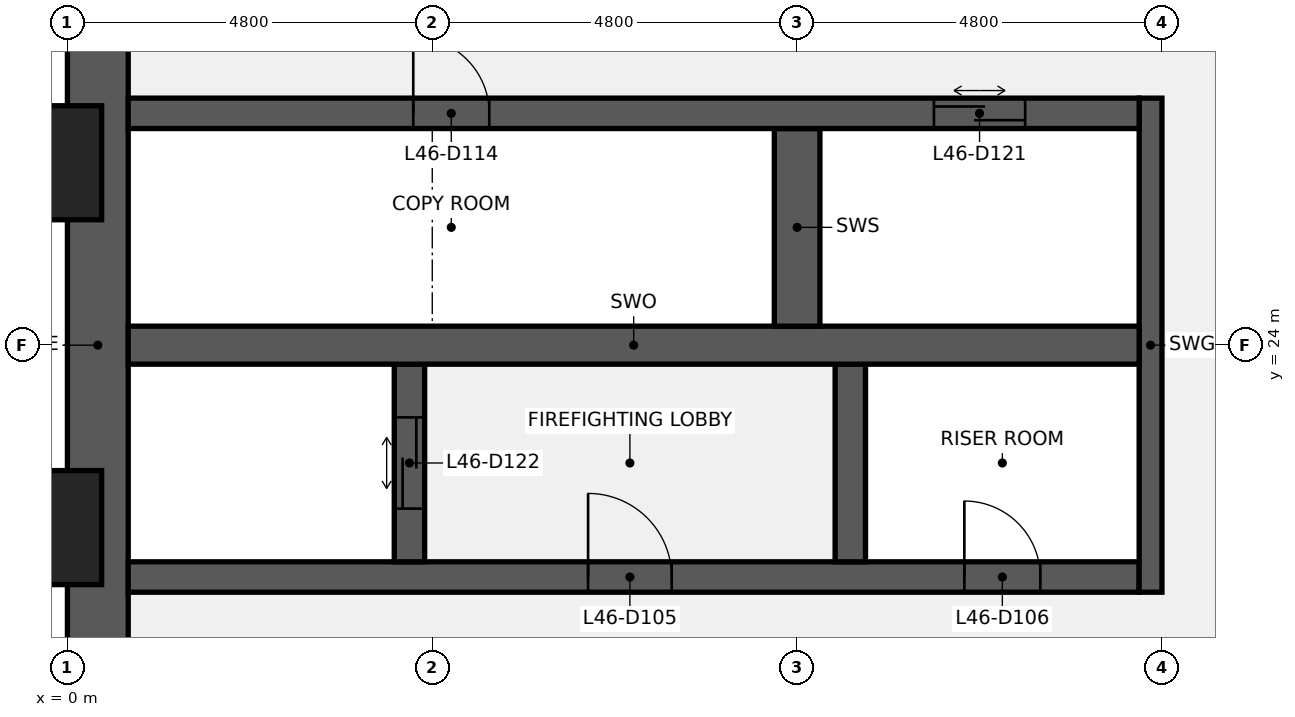
"""IFC4 building model, lengths in metres.
Left out: names, types, materials, properties, quantities, classifications, styles, units other than length and angle.
Written with IfcOpenShell. Run it as: python <this file> out.ifc"""

import sys

from ifc_helpers import new_model, si_unit, direction, frame, frame_2d, origin, origin_2d, place, context, subcontext, project, spatial, rectangle, extrude, element, fill, save


model = new_model("IFC4")
c1 = context("Model", 3, precision=1e-05, world=origin(), true_north=direction((0.0, 1.0)))
c2 = subcontext(c1, "Body", "Model", "MODEL_VIEW")
j1 = project(units=[si_unit("LENGTHUNIT", "METRE"), si_unit("PLANEANGLEUNIT", "RADIAN")], contexts=[c1])
p1 = place(None, origin())
s1 = spatial("IfcSite", under=j1, at=p1, CompositionType="ELEMENT")
p2 = place(p1, origin())
s2 = spatial("IfcBuilding", under=s1, at=p2, CompositionType="ELEMENT")
p3 = place(p2, frame((0.0, 0.0, 213.2)))
s3 = spatial("IfcBuildingStorey", under=s2, at=p3, CompositionType="ELEMENT", Elevation=213.2)
p4 = place(p3, frame((0.4, 9.6, 0.0), z_axis=(0.0, 0.0, 1.0), x_axis=(0.0, 1.0, 0.0)))
e1 = element("IfcWall", 1, at=p4, inside=s3, PredefinedType="SHEAR", context=c2, shape_type="SweptSolid", body=[
    extrude(rectangle(XDim=28.8, YDim=0.8, at=frame_2d((14.4, 0.0))), origin(), (0.0, 0.0, 1.0), 3.84),
])
p5 = place(p4, frame((8.85, 0.0, 0.9)))
e2 = element("IfcOpeningElement", 2, at=p5, cuts=e1, PredefinedType="OPENING", context=c2, shape_type="SweptSolid", body=[
    extrude(rectangle(XDim=1.5, YDim=1.5, at=frame_2d((0.75, 0.75))), frame((0.0, 0.41, 0.0), z_axis=(0.0, -1.0, 0.0), x_axis=(1.0, 0.0, 0.0)), (0.0, 0.0, 1.0), 0.82),
])
p6 = place(p4, frame((18.45, 0.0, 0.9)))
e3 = element("IfcOpeningElement", 3, at=p6, cuts=e1, PredefinedType="OPENING", context=c2, shape_type="SweptSolid", body=[
    extrude(rectangle(XDim=1.5, YDim=1.5, at=frame_2d((0.75, 0.75))), frame((0.0, 0.41, 0.0), z_axis=(0.0, -1.0, 0.0), x_axis=(1.0, 0.0, 0.0)), (0.0, 0.0, 1.0), 0.82),
])
p7 = place(p3, frame((0.8, 20.95, 0.0), z_axis=(0.0, 0.0, 1.0), x_axis=(1.0, 0.0, 0.0)))
e4 = element("IfcWall", 4, at=p7, inside=s3, PredefinedType="SHEAR", context=c2, shape_type="SweptSolid", body=[
    extrude(rectangle(XDim=13.3, YDim=0.4, at=frame_2d((6.65, 0.0))), origin(), (0.0, 0.0, 1.0), 3.84),
])
p8 = place(p7, frame((6.05, 0.0, 0.0)))
e5 = element("IfcOpeningElement", 5, at=p8, cuts=e4, PredefinedType="OPENING", context=c2, shape_type="SweptSolid", body=[
    extrude(rectangle(XDim=1.1, YDim=2.1, at=frame_2d((0.55, 1.05))), frame((0.0, 0.21, 0.0), z_axis=(0.0, -1.0, 0.0), x_axis=(1.0, 0.0, 0.0)), (0.0, 0.0, 1.0), 0.42),
])
p9 = place(p7, frame((11.0, 0.0, 0.0)))
e6 = element("IfcOpeningElement", 6, at=p9, cuts=e4, PredefinedType="OPENING", context=c2, shape_type="SweptSolid", body=[
    extrude(rectangle(XDim=1.0, YDim=2.1, at=frame_2d((0.5, 1.05))), frame((0.0, 0.21, 0.0), z_axis=(0.0, -1.0, 0.0), x_axis=(1.0, 0.0, 0.0)), (0.0, 0.0, 1.0), 0.42),
])
p10 = place(p3, frame((14.25, 20.75, 0.0), z_axis=(0.0, 0.0, 1.0), x_axis=(0.0, 1.0, 0.0)))
e7 = element("IfcWall", 7, at=p10, inside=s3, PredefinedType="SHEAR", context=c2, shape_type="SweptSolid", body=[
    extrude(rectangle(XDim=6.5, YDim=0.3, at=frame_2d((3.25, 0.0))), origin(), (0.0, 0.0, 1.0), 3.84),
])
p11 = place(p3, frame((4.5, 21.15, 0.0), z_axis=(0.0, 0.0, 1.0), x_axis=(0.0, 1.0, 0.0)))
e8 = element("IfcWall", 8, at=p11, inside=s3, PredefinedType="SHEAR", context=c2, shape_type="SweptSolid", body=[
    extrude(rectangle(XDim=2.6, YDim=0.4, at=frame_2d((1.3, 0.0))), origin(), (0.0, 0.0, 1.0), 3.84),
])
p12 = place(p11, frame((0.7, 0.0, 0.0)))
e9 = element("IfcOpeningElement", 9, at=p12, cuts=e8, PredefinedType="OPENING", context=c2, shape_type="SweptSolid", body=[
    extrude(rectangle(XDim=1.2, YDim=2.1, at=frame_2d((0.6, 1.05))), frame((0.0, 0.21, 0.0), z_axis=(0.0, -1.0, 0.0), x_axis=(1.0, 0.0, 0.0)), (0.0, 0.0, 1.0), 0.42),
])
p13 = place(p3, frame((10.3, 21.15, 0.0), z_axis=(0.0, 0.0, 1.0), x_axis=(0.0, 1.0, 0.0)))
e10 = element("IfcWall", 10, at=p13, inside=s3, PredefinedType="SHEAR", context=c2, shape_type="SweptSolid", body=[
    extrude(rectangle(XDim=2.6, YDim=0.4, at=frame_2d((1.3, 0.0))), origin(), (0.0, 0.0, 1.0), 3.84),
])
p14 = place(p3, frame((0.8, 24.0, 0.0), z_axis=(0.0, 0.0, 1.0), x_axis=(1.0, 0.0, 0.0)))
e11 = element("IfcWall", 11, at=p14, inside=s3, PredefinedType="SHEAR", context=c2, shape_type="SweptSolid", body=[
    extrude(rectangle(XDim=13.3, YDim=0.5, at=frame_2d((6.65, 0.0))), origin(), (0.0, 0.0, 1.0), 3.84),
])
p15 = place(p3, frame((9.6, 24.25, 0.0), z_axis=(0.0, 0.0, 1.0), x_axis=(0.0, 1.0, 0.0)))
e12 = element("IfcWall", 12, at=p15, inside=s3, PredefinedType="SHEAR", context=c2, shape_type="SweptSolid", body=[
    extrude(rectangle(XDim=2.6, YDim=0.6, at=frame_2d((1.3, 0.0))), origin(), (0.0, 0.0, 1.0), 3.84),
])
p16 = place(p3, frame((0.8, 27.05, 0.0), z_axis=(0.0, 0.0, 1.0), x_axis=(1.0, 0.0, 0.0)))
e13 = element("IfcWall", 13, at=p16, inside=s3, PredefinedType="SHEAR", context=c2, shape_type="SweptSolid", body=[
    extrude(rectangle(XDim=13.3, YDim=0.4, at=frame_2d((6.65, 0.0))), origin(), (0.0, 0.0, 1.0), 3.84),
])
p17 = place(p16, frame((3.75, 0.0, 0.0)))
e14 = element("IfcOpeningElement", 14, at=p17, cuts=e13, PredefinedType="OPENING", context=c2, shape_type="SweptSolid", body=[
    extrude(rectangle(XDim=1.0, YDim=2.1, at=frame_2d((0.5, 1.05))), frame((0.0, 0.21, 0.0), z_axis=(0.0, -1.0, 0.0), x_axis=(1.0, 0.0, 0.0)), (0.0, 0.0, 1.0), 0.42),
])
p18 = place(p16, frame((10.6, 0.0, 0.0)))
e15 = element("IfcOpeningElement", 15, at=p18, cuts=e13, PredefinedType="OPENING", context=c2, shape_type="SweptSolid", body=[
    extrude(rectangle(XDim=1.2, YDim=2.1, at=frame_2d((0.6, 1.05))), frame((0.0, 0.21, 0.0), z_axis=(0.0, -1.0, 0.0), x_axis=(1.0, 0.0, 0.0)), (0.0, 0.0, 1.0), 0.42),
])
for number, where, z_axis, x_axis in (
    (16, (-0.75, 21.6, 0.0), (0.0, 0.0, 1.0), (0.0, 1.0, 0.0)),
    (17, (-0.75, 26.4, 0.0), (0.0, 0.0, 1.0), (0.0, 1.0, 0.0)),
):
    element("IfcColumn", number, at=place(p3, frame(where, z_axis=z_axis, x_axis=x_axis)), inside=s3, PredefinedType="PILASTER", context=c2, shape_type="SweptSolid", body=[
        extrude(rectangle(XDim=2.4, YDim=1.5, at=origin_2d()), origin(), (0.0, 0.0, 1.0), 4.0),
    ])
p19 = place(p8, origin())
e18 = element("IfcDoor", 18, at=p19, inside=s3, OperationType="SINGLE_SWING_LEFT", PredefinedType="DOOR", context=c2, shape_type="SweptSolid", body=[
    extrude(rectangle(XDim=1.1, YDim=2.1, at=frame_2d((0.55, 1.05))), frame((0.0, 0.025, 0.0), z_axis=(0.0, -1.0, 0.0), x_axis=(1.0, 0.0, 0.0)), (0.0, 0.0, 1.0), 0.05),
])
fill(e5, e18)
p20 = place(p9, origin())
e19 = element("IfcDoor", 19, at=p20, inside=s3, OperationType="SINGLE_SWING_LEFT", PredefinedType="DOOR", context=c2, shape_type="SweptSolid", body=[
    extrude(rectangle(XDim=1.0, YDim=2.1, at=frame_2d((0.5, 1.05))), frame((0.0, 0.025, 0.0), z_axis=(0.0, -1.0, 0.0), x_axis=(1.0, 0.0, 0.0)), (0.0, 0.0, 1.0), 0.05),
])
fill(e6, e19)
p21 = place(p17, origin())
e20 = element("IfcDoor", 20, at=p21, inside=s3, OperationType="SINGLE_SWING_LEFT", PredefinedType="DOOR", context=c2, shape_type="SweptSolid", body=[
    extrude(rectangle(XDim=1.0, YDim=2.1, at=frame_2d((0.5, 1.05))), frame((0.0, 0.025, 0.0), z_axis=(0.0, -1.0, 0.0), x_axis=(1.0, 0.0, 0.0)), (0.0, 0.0, 1.0), 0.05),
])
fill(e14, e20)
p22 = place(p18, origin())
e21 = element("IfcDoor", 21, at=p22, inside=s3, OperationType="DOUBLE_DOOR_SLIDING", PredefinedType="DOOR", context=c2, shape_type="SweptSolid", body=[
    extrude(rectangle(XDim=1.2, YDim=2.1, at=frame_2d((0.6, 1.05))), frame((0.0, 0.025, 0.0), z_axis=(0.0, -1.0, 0.0), x_axis=(1.0, 0.0, 0.0)), (0.0, 0.0, 1.0), 0.05),
])
fill(e15, e21)
p23 = place(p12, origin())
e22 = element("IfcDoor", 22, at=p23, inside=s3, OperationType="DOUBLE_DOOR_SLIDING", PredefinedType="DOOR", context=c2, shape_type="SweptSolid", body=[
    extrude(rectangle(XDim=1.2, YDim=2.1, at=frame_2d((0.6, 1.05))), frame((0.0, 0.025, 0.0), z_axis=(0.0, -1.0, 0.0), x_axis=(1.0, 0.0, 0.0)), (0.0, 0.0, 1.0), 0.05),
])
fill(e9, e22)
save(model, sys.argv[1])
